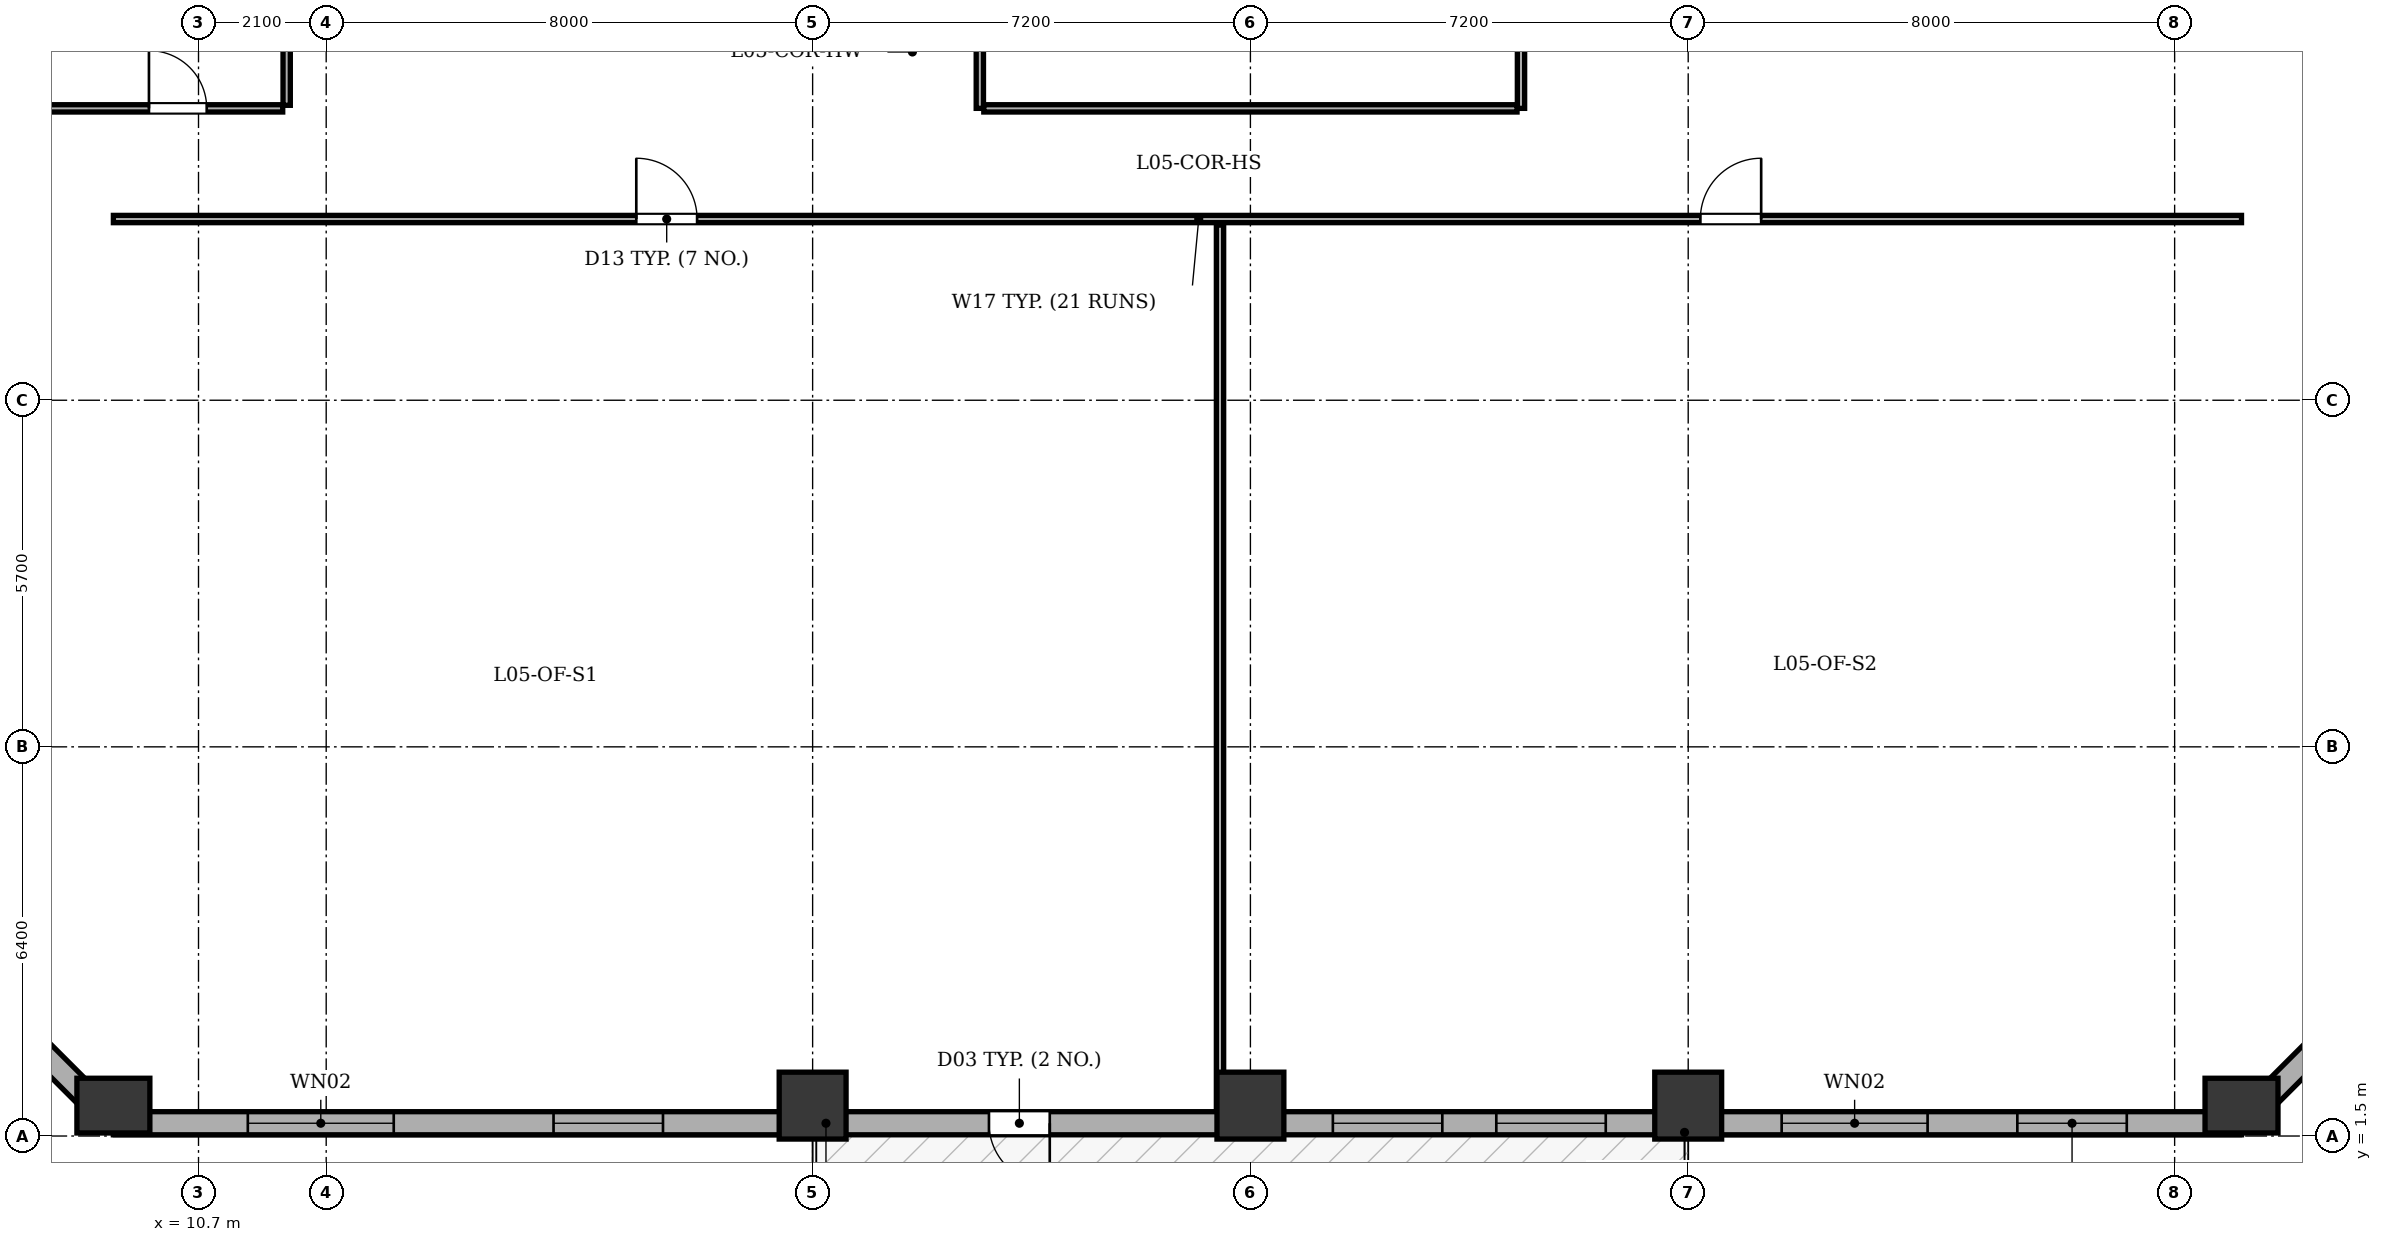
"""IFC4 building model, lengths in metres.
Left out: names, types, materials, properties, quantities, classifications, styles, units other than length and angle.
Written with IfcOpenShell. Run it as: python <this file> out.ifc"""

import sys

from ifc_helpers import new_model, si_unit, direction, frame, frame_2d, origin, origin_2d, place, context, subcontext, project, spatial, rectangle, extrude, element, fill, save


model = new_model("IFC4")
c1 = context("Model", 3, precision=1e-05, world=origin(), true_north=direction((0.0, 1.0)))
c2 = subcontext(c1, "Body", "Model", "MODEL_VIEW")
j1 = project(units=[si_unit("LENGTHUNIT", "METRE"), si_unit("PLANEANGLEUNIT", "RADIAN")], contexts=[c1])
p1 = place(None, origin())
s1 = spatial("IfcSite", under=j1, at=p1, CompositionType="ELEMENT")
p2 = place(p1, origin())
s2 = spatial("IfcBuilding", under=s1, at=p2, CompositionType="ELEMENT")
p3 = place(p2, frame((0.0, 0.0, 24.3)))
s3 = spatial("IfcBuildingStorey", under=s2, at=p3, CompositionType="ELEMENT", Elevation=24.3)
p4 = place(p3, frame((9.3, 2.0, 0.0), z_axis=(0.0, 0.0, 1.0), x_axis=(1.0, 0.0, 0.0)))
e1 = element("IfcColumn", 1, at=p4, inside=s3, PredefinedType="COLUMN", context=c2, shape_type="SweptSolid", body=[
    extrude(rectangle(XDim=0.9, YDim=1.2, at=origin_2d()), origin(), (0.0, 0.0, 1.0), 3.9),
])
for number, where, z_axis, x_axis in (
    (2, (20.8, 2.0, 0.0), (0.0, 0.0, 1.0), (1.0, 0.0, 0.0)),
    (3, (28.0, 2.0, 0.0), (0.0, 0.0, 1.0), (1.0, 0.0, 0.0)),
    (4, (35.2, 2.0, 0.0), (0.0, 0.0, 1.0), (1.0, 0.0, 0.0)),
):
    element("IfcColumn", number, at=place(p3, frame(where, z_axis=z_axis, x_axis=x_axis)), inside=s3, PredefinedType="COLUMN", context=c2, shape_type="SweptSolid", body=[
        extrude(rectangle(XDim=1.1, YDim=1.1, at=origin_2d()), origin(), (0.0, 0.0, 1.0), 3.9),
    ])
p5 = place(p3, frame((44.3, 2.0, 0.0), z_axis=(0.0, 0.0, 1.0), x_axis=(1.0, 0.0, 0.0)))
e5 = element("IfcColumn", 5, at=p5, inside=s3, PredefinedType="COLUMN", context=c2, shape_type="SweptSolid", body=[
    extrude(rectangle(XDim=0.9, YDim=1.2, at=origin_2d()), origin(), (0.0, 0.0, 1.0), 3.9),
])
p6 = place(p3, frame((44.3, 1.71, 0.0), z_axis=(0.0, 0.0, 1.0), x_axis=(-1.0, 0.0, 0.0)))
e6 = element("IfcWall", 6, at=p6, inside=s3, PredefinedType="STANDARD", context=c2, shape_type="SweptSolid", body=[
    extrude(rectangle(XDim=35.0, YDim=0.38, at=frame_2d((17.5, 0.0))), origin(), (0.0, 0.0, 1.0), 3.135),
])
p7 = place(p6, frame((19.6, 0.0, 0.0)))
e7 = element("IfcOpeningElement", 7, at=p7, cuts=e6, PredefinedType="OPENING", context=c2, shape_type="SweptSolid", body=[
    extrude(rectangle(XDim=1.0, YDim=2.02, at=frame_2d((0.5, 1.01))), frame((0.0, 0.2, 0.0), z_axis=(0.0, -1.0, 0.0), x_axis=(1.0, 0.0, 0.0)), (0.0, 0.0, 1.0), 0.4),
])
p8 = place(p6, frame((1.887, 0.0, 0.8)))
e8 = element("IfcOpeningElement", 8, at=p8, cuts=e6, PredefinedType="OPENING", context=c2, shape_type="SweptSolid", body=[
    extrude(rectangle(XDim=1.8, YDim=1.9, at=frame_2d((0.9, 0.95))), frame((0.0, 0.2, 0.0), z_axis=(0.0, -1.0, 0.0), x_axis=(1.0, 0.0, 0.0)), (0.0, 0.0, 1.0), 0.4),
])
p9 = place(p6, frame((5.163, 0.0, 0.8)))
e9 = element("IfcOpeningElement", 9, at=p9, cuts=e6, PredefinedType="OPENING", context=c2, shape_type="SweptSolid", body=[
    extrude(rectangle(XDim=2.4, YDim=1.9, at=frame_2d((1.2, 0.95))), frame((0.0, 0.2, 0.0), z_axis=(0.0, -1.0, 0.0), x_axis=(1.0, 0.0, 0.0)), (0.0, 0.0, 1.0), 0.4),
])
p10 = place(p6, frame((10.456, 0.0, 0.8)))
e10 = element("IfcOpeningElement", 10, at=p10, cuts=e6, PredefinedType="OPENING", context=c2, shape_type="SweptSolid", body=[
    extrude(rectangle(XDim=1.8, YDim=1.9, at=frame_2d((0.9, 0.95))), frame((0.0, 0.2, 0.0), z_axis=(0.0, -1.0, 0.0), x_axis=(1.0, 0.0, 0.0)), (0.0, 0.0, 1.0), 0.4),
])
p11 = place(p6, frame((13.144, 0.0, 0.8)))
e11 = element("IfcOpeningElement", 11, at=p11, cuts=e6, PredefinedType="OPENING", context=c2, shape_type="SweptSolid", body=[
    extrude(rectangle(XDim=1.8, YDim=1.9, at=frame_2d((0.9, 0.95))), frame((0.0, 0.2, 0.0), z_axis=(0.0, -1.0, 0.0), x_axis=(1.0, 0.0, 0.0)), (0.0, 0.0, 1.0), 0.4),
])
p12 = place(p6, frame((25.961, 0.0, 0.8)))
e12 = element("IfcOpeningElement", 12, at=p12, cuts=e6, PredefinedType="OPENING", context=c2, shape_type="SweptSolid", body=[
    extrude(rectangle(XDim=1.8, YDim=1.9, at=frame_2d((0.9, 0.95))), frame((0.0, 0.2, 0.0), z_axis=(0.0, -1.0, 0.0), x_axis=(1.0, 0.0, 0.0)), (0.0, 0.0, 1.0), 0.4),
])
p13 = place(p6, frame((30.389, 0.0, 0.8)))
e13 = element("IfcOpeningElement", 13, at=p13, cuts=e6, PredefinedType="OPENING", context=c2, shape_type="SweptSolid", body=[
    extrude(rectangle(XDim=2.4, YDim=1.9, at=frame_2d((1.2, 0.95))), frame((0.0, 0.2, 0.0), z_axis=(0.0, -1.0, 0.0), x_axis=(1.0, 0.0, 0.0)), (0.0, 0.0, 1.0), 0.4),
])
p14 = place(p3, frame((9.3, 1.71, 0.0), z_axis=(0.0, 0.0, 1.0), x_axis=(-0.707106781187, 0.707106781187, 0.0)))
e14 = element("IfcWall", 14, at=p14, inside=s3, PredefinedType="STANDARD", context=c2, shape_type="SweptSolid", body=[
    extrude(rectangle(XDim=6.774, YDim=0.38, at=frame_2d((3.387, 0.0))), origin(), (0.0, 0.0, 1.0), 3.135),
])
p15 = place(p14, frame((2.687, 0.0, 0.8)))
e15 = element("IfcOpeningElement", 15, at=p15, cuts=e14, PredefinedType="OPENING", context=c2, shape_type="SweptSolid", body=[
    extrude(rectangle(XDim=1.4, YDim=1.65, at=frame_2d((0.7, 0.825))), frame((0.0, 0.2, 0.0), z_axis=(0.0, -1.0, 0.0), x_axis=(1.0, 0.0, 0.0)), (0.0, 0.0, 1.0), 0.4),
])
p16 = place(p3, frame((49.09, 6.5, 0.0), z_axis=(0.0, 0.0, 1.0), x_axis=(-0.707106781187, -0.707106781187, 0.0)))
e16 = element("IfcWall", 16, at=p16, inside=s3, PredefinedType="STANDARD", context=c2, shape_type="SweptSolid", body=[
    extrude(rectangle(XDim=6.774, YDim=0.38, at=frame_2d((3.387, 0.0))), origin(), (0.0, 0.0, 1.0), 3.135),
])
p17 = place(p16, frame((2.687, 0.0, 0.8)))
e17 = element("IfcOpeningElement", 17, at=p17, cuts=e16, PredefinedType="OPENING", context=c2, shape_type="SweptSolid", body=[
    extrude(rectangle(XDim=1.4, YDim=1.65, at=frame_2d((0.7, 0.825))), frame((0.0, 0.2, 0.0), z_axis=(0.0, -1.0, 0.0), x_axis=(1.0, 0.0, 0.0)), (0.0, 0.0, 1.0), 0.4),
])
for number, where, z_axis, x_axis in (
    (18, (23.55, 18.4, 0.0), (0.0, 0.0, 1.0), (0.0, 1.0, 0.0)),
    (19, (32.45, 18.4, 0.0), (0.0, 0.0, 1.0), (0.0, 1.0, 0.0)),
):
    element("IfcWall", number, at=place(p3, frame(where, z_axis=z_axis, x_axis=x_axis)), inside=s3, PredefinedType="PARTITIONING", context=c2, shape_type="SweptSolid", body=[
        extrude(rectangle(XDim=3.485, YDim=0.12, at=frame_2d((1.743, 0.0))), origin(), (0.0, 0.0, 1.0), 3.6),
    ])
p18 = place(p3, frame((23.615, 18.4, 0.0), z_axis=(0.0, 0.0, 1.0), x_axis=(1.0, 0.0, 0.0)))
e20 = element("IfcWall", 20, at=p18, inside=s3, PredefinedType="PARTITIONING", context=c2, shape_type="SweptSolid", body=[
    extrude(rectangle(XDim=8.77, YDim=0.12, at=frame_2d((4.385, 0.0))), origin(), (0.0, 0.0, 1.0), 3.6),
])
p19 = place(p3, frame((9.3, 16.58, 0.0), z_axis=(0.0, 0.0, 1.0), x_axis=(1.0, 0.0, 0.0)))
e21 = element("IfcWall", 21, at=p19, inside=s3, PredefinedType="PARTITIONING", context=c2, shape_type="SweptSolid", body=[
    extrude(rectangle(XDim=35.0, YDim=0.12, at=frame_2d((17.5, 0.0))), origin(), (0.0, 0.0, 1.0), 3.6),
])
p20 = place(p19, frame((8.6, 0.0, 0.0)))
e22 = element("IfcOpeningElement", 22, at=p20, cuts=e21, PredefinedType="OPENING", context=c2, shape_type="SweptSolid", body=[
    extrude(rectangle(XDim=1.0, YDim=2.1, at=frame_2d((0.5, 1.05))), frame((0.0, 0.07, 0.0), z_axis=(0.0, -1.0, 0.0), x_axis=(1.0, 0.0, 0.0)), (0.0, 0.0, 1.0), 0.14),
])
p21 = place(p19, frame((26.1, 0.0, 0.0)))
e23 = element("IfcOpeningElement", 23, at=p21, cuts=e21, PredefinedType="OPENING", context=c2, shape_type="SweptSolid", body=[
    extrude(rectangle(XDim=1.0, YDim=2.1, at=frame_2d((0.5, 1.05))), frame((0.0, 0.07, 0.0), z_axis=(0.0, -1.0, 0.0), x_axis=(1.0, 0.0, 0.0)), (0.0, 0.0, 1.0), 0.14),
])
p22 = place(p3, frame((27.5, 1.905, 0.0), z_axis=(0.0, 0.0, 1.0), x_axis=(0.0, 1.0, 0.0)))
e24 = element("IfcWall", 24, at=p22, inside=s3, PredefinedType="PARTITIONING", context=c2, shape_type="SweptSolid", body=[
    extrude(rectangle(XDim=14.575, YDim=0.12, at=frame_2d((7.288, 0.0))), origin(), (0.0, 0.0, 1.0), 3.6),
])
p23 = place(p3, frame((12.15, 18.45, 0.0), z_axis=(0.0, 0.0, 1.0), x_axis=(0.0, 1.0, 0.0)))
e25 = element("IfcWall", 25, at=p23, inside=s3, PredefinedType="PARTITIONING", context=c2, shape_type="SweptSolid", body=[
    extrude(rectangle(XDim=17.5, YDim=0.12, at=frame_2d((8.75, 0.0))), origin(), (0.0, 0.0, 1.0), 3.6),
])
p24 = place(p3, frame((4.705, 18.4, 0.0), z_axis=(0.0, 0.0, 1.0), x_axis=(1.0, 0.0, 0.0)))
e26 = element("IfcWall", 26, at=p24, inside=s3, PredefinedType="PARTITIONING", context=c2, shape_type="SweptSolid", body=[
    extrude(rectangle(XDim=7.38, YDim=0.12, at=frame_2d((3.69, 0.0))), origin(), (0.0, 0.0, 1.0), 3.6),
])
p25 = place(p24, frame((5.18, 0.0, 0.0)))
e27 = element("IfcOpeningElement", 27, at=p25, cuts=e26, PredefinedType="OPENING", context=c2, shape_type="SweptSolid", body=[
    extrude(rectangle(XDim=0.95, YDim=2.1, at=frame_2d((0.475, 1.05))), frame((0.0, 0.07, 0.0), z_axis=(0.0, -1.0, 0.0), x_axis=(1.0, 0.0, 0.0)), (0.0, 0.0, 1.0), 0.14),
])
p26 = place(p7, origin())
e28 = element("IfcDoor", 28, at=p26, inside=s3, OperationType="SINGLE_SWING_LEFT", PredefinedType="DOOR", context=c2, shape_type="SweptSolid", body=[
    extrude(rectangle(XDim=1.0, YDim=2.02, at=frame_2d((0.5, 1.01))), frame((0.0, 0.025, 0.0), z_axis=(0.0, -1.0, 0.0), x_axis=(1.0, 0.0, 0.0)), (0.0, 0.0, 1.0), 0.05),
])
fill(e7, e28)
p27 = place(p8, origin())
e29 = element("IfcWindow", 29, at=p27, inside=s3, PartitioningType="SINGLE_PANEL", PredefinedType="WINDOW", context=c2, shape_type="SweptSolid", body=[
    extrude(rectangle(XDim=1.8, YDim=1.9, at=frame_2d((0.9, 0.95))), frame((0.0, -0.01, 0.0), z_axis=(0.0, -1.0, 0.0), x_axis=(1.0, 0.0, 0.0)), (0.0, 0.0, 1.0), 0.06),
])
fill(e8, e29)
p28 = place(p9, origin())
e30 = element("IfcWindow", 30, at=p28, inside=s3, PartitioningType="SINGLE_PANEL", PredefinedType="WINDOW", context=c2, shape_type="SweptSolid", body=[
    extrude(rectangle(XDim=2.4, YDim=1.9, at=frame_2d((1.2, 0.95))), frame((0.0, -0.01, 0.0), z_axis=(0.0, -1.0, 0.0), x_axis=(1.0, 0.0, 0.0)), (0.0, 0.0, 1.0), 0.06),
])
fill(e9, e30)
p29 = place(p10, origin())
e31 = element("IfcWindow", 31, at=p29, inside=s3, PartitioningType="SINGLE_PANEL", PredefinedType="WINDOW", context=c2, shape_type="SweptSolid", body=[
    extrude(rectangle(XDim=1.8, YDim=1.9, at=frame_2d((0.9, 0.95))), frame((0.0, -0.01, 0.0), z_axis=(0.0, -1.0, 0.0), x_axis=(1.0, 0.0, 0.0)), (0.0, 0.0, 1.0), 0.06),
])
fill(e10, e31)
p30 = place(p11, origin())
e32 = element("IfcWindow", 32, at=p30, inside=s3, PartitioningType="SINGLE_PANEL", PredefinedType="WINDOW", context=c2, shape_type="SweptSolid", body=[
    extrude(rectangle(XDim=1.8, YDim=1.9, at=frame_2d((0.9, 0.95))), frame((0.0, -0.01, 0.0), z_axis=(0.0, -1.0, 0.0), x_axis=(1.0, 0.0, 0.0)), (0.0, 0.0, 1.0), 0.06),
])
fill(e11, e32)
p31 = place(p12, origin())
e33 = element("IfcWindow", 33, at=p31, inside=s3, PartitioningType="SINGLE_PANEL", PredefinedType="WINDOW", context=c2, shape_type="SweptSolid", body=[
    extrude(rectangle(XDim=1.8, YDim=1.9, at=frame_2d((0.9, 0.95))), frame((0.0, -0.01, 0.0), z_axis=(0.0, -1.0, 0.0), x_axis=(1.0, 0.0, 0.0)), (0.0, 0.0, 1.0), 0.06),
])
fill(e12, e33)
p32 = place(p13, origin())
e34 = element("IfcWindow", 34, at=p32, inside=s3, PartitioningType="SINGLE_PANEL", PredefinedType="WINDOW", context=c2, shape_type="SweptSolid", body=[
    extrude(rectangle(XDim=2.4, YDim=1.9, at=frame_2d((1.2, 0.95))), frame((0.0, -0.01, 0.0), z_axis=(0.0, -1.0, 0.0), x_axis=(1.0, 0.0, 0.0)), (0.0, 0.0, 1.0), 0.06),
])
fill(e13, e34)
p33 = place(p20, origin())
e35 = element("IfcDoor", 35, at=p33, inside=s3, OperationType="SINGLE_SWING_LEFT", PredefinedType="DOOR", context=c2, shape_type="SweptSolid", body=[
    extrude(rectangle(XDim=1.0, YDim=2.1, at=frame_2d((0.5, 1.05))), frame((0.0, 0.025, 0.0), z_axis=(0.0, -1.0, 0.0), x_axis=(1.0, 0.0, 0.0)), (0.0, 0.0, 1.0), 0.05),
])
fill(e22, e35)
p34 = place(p21, origin())
e36 = element("IfcDoor", 36, at=p34, inside=s3, OperationType="SINGLE_SWING_RIGHT", PredefinedType="DOOR", context=c2, shape_type="SweptSolid", body=[
    extrude(rectangle(XDim=1.0, YDim=2.1, at=frame_2d((0.5, 1.05))), frame((0.0, 0.025, 0.0), z_axis=(0.0, -1.0, 0.0), x_axis=(1.0, 0.0, 0.0)), (0.0, 0.0, 1.0), 0.05),
])
fill(e23, e36)
p35 = place(p25, origin())
e37 = element("IfcDoor", 37, at=p35, inside=s3, OperationType="SINGLE_SWING_LEFT", PredefinedType="DOOR", context=c2, shape_type="SweptSolid", body=[
    extrude(rectangle(XDim=0.95, YDim=2.1, at=frame_2d((0.475, 1.05))), frame((0.0, 0.025, 0.0), z_axis=(0.0, -1.0, 0.0), x_axis=(1.0, 0.0, 0.0)), (0.0, 0.0, 1.0), 0.05),
])
fill(e27, e37)
save(model, sys.argv[1])
